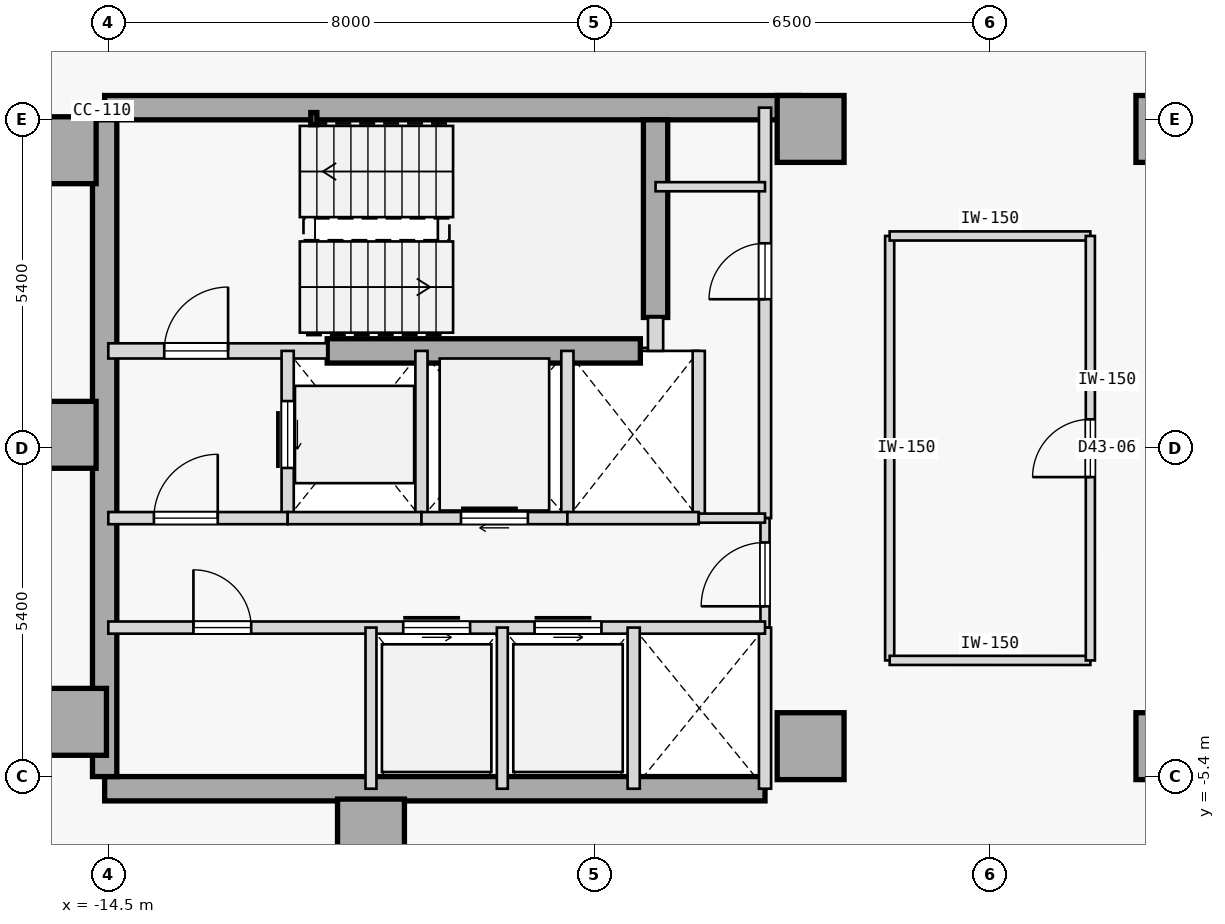
"""IFC4 building model, lengths in metres.
Left out: names, types, materials, properties, quantities, classifications, styles, units other than length and angle.
Written with IfcOpenShell. Run it as: python <this file> out.ifc"""

import sys

from ifc_helpers import new_model, si_unit, direction, frame, frame_2d, origin, origin_2d, place, context, subcontext, project, spatial, rectangle, hollow_rectangle, extrude, element, fill, save


model = new_model("IFC4")
c1 = context("Model", 3, precision=1e-05, world=origin(), true_north=direction((0.0, 1.0)))
c2 = subcontext(c1, "Body", "Model", "MODEL_VIEW")
j1 = project(units=[si_unit("LENGTHUNIT", "METRE"), si_unit("PLANEANGLEUNIT", "RADIAN")], contexts=[c1])
p1 = place(None, origin())
s1 = spatial("IfcSite", under=j1, at=p1, CompositionType="ELEMENT")
p2 = place(p1, origin())
s2 = spatial("IfcBuilding", under=s1, at=p2, CompositionType="ELEMENT")
p3 = place(p2, frame((0.0, 0.0, 168.4)))
s3 = spatial("IfcBuildingStorey", under=s2, at=p3, CompositionType="ELEMENT", Elevation=168.4)
for number, where, z_axis, x_axis in (
    (1, (-15.25, 4.9, 0.0), (0.0, 0.0, 1.0), (1.0, 0.0, 0.0)),
    (2, (-15.25, 0.22, 0.0), (0.0, 0.0, 1.0), (1.0, 0.0, 0.0)),
    (3, (-15.08, -4.5, 0.0), (0.0, 0.0, 1.0), (1.0, 0.0, 0.0)),
    (4, (-10.18, -6.32, 0.0), (0.0, 0.0, 1.0), (1.0, 0.0, 0.0)),
    (5, (-2.95, -4.9, 0.0), (0.0, 0.0, 1.0), (1.0, 0.0, 0.0)),
    (6, (-2.95, 5.25, 0.0), (0.0, 0.0, 1.0), (1.0, 0.0, 0.0)),
    (7, (2.95, -4.9, 0.0), (0.0, 0.0, 1.0), (1.0, 0.0, 0.0)),
    (8, (2.95, 5.25, 0.0), (0.0, 0.0, 1.0), (1.0, 0.0, 0.0)),
):
    element("IfcColumn", number, at=place(p3, frame(where, z_axis=z_axis, x_axis=x_axis)), inside=s3, PredefinedType="COLUMN", context=c2, shape_type="SweptSolid", body=[
        extrude(rectangle(XDim=1.1, YDim=1.1, at=origin_2d()), origin(), (0.0, 0.0, 1.0), 3.4),
    ])
p4 = place(p3, frame((-14.56, 5.6, 0.0), z_axis=(0.0, 0.0, 1.0), x_axis=(1.0, 0.0, 0.0)))
e9 = element("IfcWall", 9, at=p4, inside=s3, PredefinedType="SHEAR", context=c2, shape_type="SweptSolid", body=[
    extrude(rectangle(XDim=11.41, YDim=0.4, at=frame_2d((5.705, 0.0))), origin(), (0.0, 0.0, 1.0), 3.175),
])
p5 = place(p3, frame((-14.56, -5.6, 0.0), z_axis=(0.0, 0.0, 1.0), x_axis=(1.0, 0.0, 0.0)))
e10 = element("IfcWall", 10, at=p5, inside=s3, PredefinedType="SHEAR", context=c2, shape_type="SweptSolid", body=[
    extrude(rectangle(XDim=10.86, YDim=0.4, at=frame_2d((5.43, 0.0))), origin(), (0.0, 0.0, 1.0), 3.175),
])
p6 = place(p3, frame((-14.56, -5.4, 0.0), z_axis=(0.0, 0.0, 1.0), x_axis=(0.0, 1.0, 0.0)))
e11 = element("IfcWall", 11, at=p6, inside=s3, PredefinedType="SHEAR", context=c2, shape_type="SweptSolid", body=[
    extrude(rectangle(XDim=10.8, YDim=0.4, at=frame_2d((5.4, 0.0))), origin(), (0.0, 0.0, 1.0), 3.175),
])
p7 = place(p3, frame((-5.5, 2.15, 0.0), z_axis=(0.0, 0.0, 1.0), x_axis=(0.0, 1.0, 0.0)))
e12 = element("IfcWall", 12, at=p7, inside=s3, PredefinedType="SHEAR", context=c2, shape_type="SweptSolid", body=[
    extrude(rectangle(XDim=3.25, YDim=0.4, at=frame_2d((1.625, 0.0))), origin(), (0.0, 0.0, 1.0), 3.175),
])
p8 = place(p3, frame((-10.9, 1.6, 0.0), z_axis=(0.0, 0.0, 1.0), x_axis=(1.0, 0.0, 0.0)))
e13 = element("IfcWall", 13, at=p8, inside=s3, PredefinedType="SHEAR", context=c2, shape_type="SweptSolid", body=[
    extrude(rectangle(XDim=5.15, YDim=0.4, at=frame_2d((2.575, 0.0))), origin(), (0.0, 0.0, 1.0), 3.175),
])
p9 = place(p3, frame((-11.12, 5.42, 0.0), z_axis=(0.0, 0.0, 1.0), x_axis=(1.0, 0.0, 0.0)))
e14 = element("IfcColumn", 14, at=p9, inside=s3, PredefinedType="COLUMN", context=c2, shape_type="SweptSolid", body=[
    extrude(hollow_rectangle(XDim=0.1, YDim=0.2, WallThickness=0.008, at=origin_2d()), origin(), (0.0, 0.0, 1.0), 3.4),
])
p10 = place(p3, frame((-14.5, 1.6, 0.0), z_axis=(0.0, 0.0, 1.0), x_axis=(1.0, 0.0, 0.0)))
e15 = element("IfcWall", 15, at=p10, inside=s3, PredefinedType="STANDARD", context=c2, shape_type="SweptSolid", body=[
    extrude(rectangle(XDim=3.6, YDim=0.25, at=frame_2d((1.8, 0.0))), origin(), (0.0, 0.0, 1.0), 3.175),
])
p11 = place(p10, frame((0.92, 0.0, 0.0)))
e16 = element("IfcOpeningElement", 16, at=p11, cuts=e15, PredefinedType="OPENING", context=c2, shape_type="SweptSolid", body=[
    extrude(rectangle(XDim=1.05, YDim=2.15, at=frame_2d((0.525, 1.075))), frame((0.0, 0.135, 0.0), z_axis=(0.0, -1.0, 0.0), x_axis=(1.0, 0.0, 0.0)), (0.0, 0.0, 1.0), 0.27),
])
p12 = place(p3, frame((-5.5, 1.6, 0.0), z_axis=(0.0, 0.0, 1.0), x_axis=(0.0, 1.0, 0.0)))
e17 = element("IfcWall", 17, at=p12, inside=s3, PredefinedType="STANDARD", context=c2, shape_type="SweptSolid", body=[
    extrude(rectangle(XDim=0.55, YDim=0.25, at=frame_2d((0.275, 0.0))), origin(), (0.0, 0.0, 1.0), 3.175),
])
p13 = place(p3, frame((-3.7, -1.15, 0.0), z_axis=(0.0, 0.0, 1.0), x_axis=(0.0, 1.0, 0.0)))
e18 = element("IfcWall", 18, at=p13, inside=s3, PredefinedType="STANDARD", context=c2, shape_type="SweptSolid", body=[
    extrude(rectangle(XDim=6.75, YDim=0.2, at=frame_2d((3.375, 0.0))), origin(), (0.0, 0.0, 1.0), 3.175),
])
p14 = place(p13, frame((3.6, 0.0, 0.0)))
e19 = element("IfcOpeningElement", 19, at=p14, cuts=e18, PredefinedType="OPENING", context=c2, shape_type="SweptSolid", body=[
    extrude(rectangle(XDim=0.92, YDim=2.15, at=frame_2d((0.46, 1.075))), frame((0.0, 0.11, 0.0), z_axis=(0.0, -1.0, 0.0), x_axis=(1.0, 0.0, 0.0)), (0.0, 0.0, 1.0), 0.22),
])
p15 = place(p3, frame((-3.7, -2.95, 0.0), z_axis=(0.0, 0.0, 1.0), x_axis=(0.0, 1.0, 0.0)))
e20 = element("IfcWall", 20, at=p15, inside=s3, PredefinedType="PARTITIONING", context=c2, shape_type="SweptSolid", body=[
    extrude(rectangle(XDim=1.8, YDim=0.15, at=frame_2d((0.9, 0.0))), origin(), (0.0, 0.0, 1.0), 3.175),
])
p16 = place(p15, frame((0.35, 0.0, 0.0)))
e21 = element("IfcOpeningElement", 21, at=p16, cuts=e20, PredefinedType="OPENING", context=c2, shape_type="SweptSolid", body=[
    extrude(rectangle(XDim=1.05, YDim=2.18, at=frame_2d((0.525, 1.09))), frame((0.0, 0.085, 0.0), z_axis=(0.0, -1.0, 0.0), x_axis=(1.0, 0.0, 0.0)), (0.0, 0.0, 1.0), 0.17),
])
p17 = place(p3, frame((-3.7, -5.6, 0.0), z_axis=(0.0, 0.0, 1.0), x_axis=(0.0, 1.0, 0.0)))
e22 = element("IfcWall", 22, at=p17, inside=s3, PredefinedType="STANDARD", context=c2, shape_type="SweptSolid", body=[
    extrude(rectangle(XDim=2.65, YDim=0.2, at=frame_2d((1.325, 0.0))), origin(), (0.0, 0.0, 1.0), 3.175),
])
p18 = place(p3, frame((-11.55, -1.15, 0.0), z_axis=(0.0, 0.0, 1.0), x_axis=(0.0, 1.0, 0.0)))
e23 = element("IfcWall", 23, at=p18, inside=s3, PredefinedType="STANDARD", context=c2, shape_type="SweptSolid", body=[
    extrude(rectangle(XDim=2.75, YDim=0.2, at=frame_2d((1.375, 0.0))), origin(), (0.0, 0.0, 1.0), 3.175),
])
p19 = place(p18, frame((0.825, 0.0, 0.0)))
e24 = element("IfcOpeningElement", 24, at=p19, cuts=e23, PredefinedType="OPENING", context=c2, shape_type="SweptSolid", body=[
    extrude(rectangle(XDim=1.1, YDim=2.15, at=frame_2d((0.55, 1.075))), frame((0.0, 0.11, 0.0), z_axis=(0.0, -1.0, 0.0), x_axis=(1.0, 0.0, 0.0)), (0.0, 0.0, 1.0), 0.22),
])
p20 = place(p3, frame((-9.35, -1.15, 0.0), z_axis=(0.0, 0.0, 1.0), x_axis=(0.0, 1.0, 0.0)))
e25 = element("IfcWall", 25, at=p20, inside=s3, PredefinedType="STANDARD", context=c2, shape_type="SweptSolid", body=[
    extrude(rectangle(XDim=2.75, YDim=0.2, at=frame_2d((1.375, 0.0))), origin(), (0.0, 0.0, 1.0), 3.175),
])
p21 = place(p3, frame((-14.5, -1.15, 0.0), z_axis=(0.0, 0.0, 1.0), x_axis=(1.0, 0.0, 0.0)))
e26 = element("IfcWall", 26, at=p21, inside=s3, PredefinedType="STANDARD", context=c2, shape_type="SweptSolid", body=[
    extrude(rectangle(XDim=2.95, YDim=0.2, at=frame_2d((1.475, 0.0))), origin(), (0.0, 0.0, 1.0), 3.175),
])
p22 = place(p21, frame((0.75, 0.0, 0.0)))
e27 = element("IfcOpeningElement", 27, at=p22, cuts=e26, PredefinedType="OPENING", context=c2, shape_type="SweptSolid", body=[
    extrude(rectangle(XDim=1.05, YDim=2.18, at=frame_2d((0.525, 1.09))), frame((0.0, 0.11, 0.0), z_axis=(0.0, -1.0, 0.0), x_axis=(1.0, 0.0, 0.0)), (0.0, 0.0, 1.0), 0.22),
])
p23 = place(p3, frame((-11.55, -1.15, 0.0), z_axis=(0.0, 0.0, 1.0), x_axis=(1.0, 0.0, 0.0)))
e28 = element("IfcWall", 28, at=p23, inside=s3, PredefinedType="STANDARD", context=c2, shape_type="SweptSolid", body=[
    extrude(rectangle(XDim=2.2, YDim=0.2, at=frame_2d((1.1, 0.0))), origin(), (0.0, 0.0, 1.0), 3.175),
])
p24 = place(p3, frame((-6.95, -1.15, 0.0), z_axis=(0.0, 0.0, 1.0), x_axis=(0.0, 1.0, 0.0)))
e29 = element("IfcWall", 29, at=p24, inside=s3, PredefinedType="STANDARD", context=c2, shape_type="SweptSolid", body=[
    extrude(rectangle(XDim=2.75, YDim=0.2, at=frame_2d((1.375, 0.0))), origin(), (0.0, 0.0, 1.0), 3.175),
])
p25 = place(p3, frame((-9.35, -1.15, 0.0), z_axis=(0.0, 0.0, 1.0), x_axis=(1.0, 0.0, 0.0)))
e30 = element("IfcWall", 30, at=p25, inside=s3, PredefinedType="STANDARD", context=c2, shape_type="SweptSolid", body=[
    extrude(rectangle(XDim=2.4, YDim=0.2, at=frame_2d((1.2, 0.0))), origin(), (0.0, 0.0, 1.0), 3.175),
])
p26 = place(p25, frame((0.65, 0.0, 0.0)))
e31 = element("IfcOpeningElement", 31, at=p26, cuts=e30, PredefinedType="OPENING", context=c2, shape_type="SweptSolid", body=[
    extrude(rectangle(XDim=1.1, YDim=2.15, at=frame_2d((0.55, 1.075))), frame((0.0, 0.11, 0.0), z_axis=(0.0, -1.0, 0.0), x_axis=(1.0, 0.0, 0.0)), (0.0, 0.0, 1.0), 0.22),
])
p27 = place(p3, frame((-4.79, -1.15, 0.0), z_axis=(0.0, 0.0, 1.0), x_axis=(0.0, 1.0, 0.0)))
e32 = element("IfcWall", 32, at=p27, inside=s3, PredefinedType="STANDARD", context=c2, shape_type="SweptSolid", body=[
    extrude(rectangle(XDim=2.75, YDim=0.2, at=frame_2d((1.375, 0.0))), origin(), (0.0, 0.0, 1.0), 3.175),
])
p28 = place(p3, frame((-6.95, -1.15, 0.0), z_axis=(0.0, 0.0, 1.0), x_axis=(1.0, 0.0, 0.0)))
e33 = element("IfcWall", 33, at=p28, inside=s3, PredefinedType="STANDARD", context=c2, shape_type="SweptSolid", body=[
    extrude(rectangle(XDim=2.16, YDim=0.2, at=frame_2d((1.08, 0.0))), origin(), (0.0, 0.0, 1.0), 3.175),
])
p29 = place(p3, frame((-4.79, -1.15, 0.0), z_axis=(0.0, 0.0, 1.0), x_axis=(1.0, 0.0, 0.0)))
e34 = element("IfcWall", 34, at=p29, inside=s3, PredefinedType="PARTITIONING", context=c2, shape_type="SweptSolid", body=[
    extrude(rectangle(XDim=1.09, YDim=0.15, at=frame_2d((0.545, 0.0))), origin(), (0.0, 0.0, 1.0), 3.175),
])
p30 = place(p3, frame((-14.5, -2.95, 0.0), z_axis=(0.0, 0.0, 1.0), x_axis=(1.0, 0.0, 0.0)))
e35 = element("IfcWall", 35, at=p30, inside=s3, PredefinedType="STANDARD", context=c2, shape_type="SweptSolid", body=[
    extrude(rectangle(XDim=10.8, YDim=0.2, at=frame_2d((5.4, 0.0))), origin(), (0.0, 0.0, 1.0), 3.175),
])
p31 = place(p30, frame((4.85, 0.0, 0.0)))
e36 = element("IfcOpeningElement", 36, at=p31, cuts=e35, PredefinedType="OPENING", context=c2, shape_type="SweptSolid", body=[
    extrude(rectangle(XDim=1.1, YDim=2.15, at=frame_2d((0.55, 1.075))), frame((0.0, 0.11, 0.0), z_axis=(0.0, -1.0, 0.0), x_axis=(1.0, 0.0, 0.0)), (0.0, 0.0, 1.0), 0.22),
])
p32 = place(p30, frame((7.01, 0.0, 0.0)))
e37 = element("IfcOpeningElement", 37, at=p32, cuts=e35, PredefinedType="OPENING", context=c2, shape_type="SweptSolid", body=[
    extrude(rectangle(XDim=1.1, YDim=2.15, at=frame_2d((0.55, 1.075))), frame((0.0, 0.11, 0.0), z_axis=(0.0, -1.0, 0.0), x_axis=(1.0, 0.0, 0.0)), (0.0, 0.0, 1.0), 0.22),
])
p33 = place(p30, frame((1.4, 0.0, 0.0)))
e38 = element("IfcOpeningElement", 38, at=p33, cuts=e35, PredefinedType="OPENING", context=c2, shape_type="SweptSolid", body=[
    extrude(rectangle(XDim=0.95, YDim=2.15, at=frame_2d((0.475, 1.075))), frame((0.0, 0.11, 0.0), z_axis=(0.0, -1.0, 0.0), x_axis=(1.0, 0.0, 0.0)), (0.0, 0.0, 1.0), 0.22),
])
p34 = place(p3, frame((-5.86, -5.6, 0.0), z_axis=(0.0, 0.0, 1.0), x_axis=(0.0, 1.0, 0.0)))
e39 = element("IfcWall", 39, at=p34, inside=s3, PredefinedType="STANDARD", context=c2, shape_type="SweptSolid", body=[
    extrude(rectangle(XDim=2.65, YDim=0.2, at=frame_2d((1.325, 0.0))), origin(), (0.0, 0.0, 1.0), 3.175),
])
for number, where, z_axis, x_axis in (
    (40, (-10.18, -5.6, 0.0), (0.0, 0.0, 1.0), (0.0, 1.0, 0.0)),
    (41, (-8.02, -5.6, 0.0), (0.0, 0.0, 1.0), (0.0, 1.0, 0.0)),
):
    element("IfcWall", number, at=place(p3, frame(where, z_axis=z_axis, x_axis=x_axis)), inside=s3, PredefinedType="STANDARD", context=c2, shape_type="SweptSolid", body=[
        extrude(rectangle(XDim=2.65, YDim=0.18, at=frame_2d((1.325, 0.0))), origin(), (0.0, 0.0, 1.0), 3.175),
    ])
p35 = place(p3, frame((-5.5, 4.3, 0.0), z_axis=(0.0, 0.0, 1.0), x_axis=(1.0, 0.0, 0.0)))
e42 = element("IfcWall", 42, at=p35, inside=s3, PredefinedType="PARTITIONING", context=c2, shape_type="SweptSolid", body=[
    extrude(rectangle(XDim=1.8, YDim=0.15, at=frame_2d((0.9, 0.0))), origin(), (0.0, 0.0, 1.0), 3.175),
])
p36 = place(p3, frame((-1.65, -3.49, 0.0), z_axis=(0.0, 0.0, 1.0), x_axis=(-3.4979712e-05, 0.999999999388, 0.0)))
e43 = element("IfcWall", 43, at=p36, inside=s3, PredefinedType="PARTITIONING", context=c2, shape_type="SweptSolid", body=[
    extrude(rectangle(XDim=6.979, YDim=0.15, at=frame_2d((3.49, 0.0))), origin(), (0.0, 0.0, 1.0), 3.175),
])
p37 = place(p3, frame((-1.65, -3.49, 0.0), z_axis=(0.0, 0.0, 1.0), x_axis=(0.999999975374, -0.000221926315, 0.0)))
e44 = element("IfcWall", 44, at=p37, inside=s3, PredefinedType="PARTITIONING", context=c2, shape_type="SweptSolid", body=[
    extrude(rectangle(XDim=3.3, YDim=0.15, at=frame_2d((1.65, 0.0))), origin(), (0.0, 0.0, 1.0), 3.175),
])
p38 = place(p3, frame((-1.65, 3.49, 0.0), z_axis=(0.0, 0.0, 1.0), x_axis=(1.0, 0.0, 0.0)))
e45 = element("IfcWall", 45, at=p38, inside=s3, PredefinedType="PARTITIONING", context=c2, shape_type="SweptSolid", body=[
    extrude(rectangle(XDim=3.3, YDim=0.15, at=frame_2d((1.65, 0.0))), origin(), (0.0, 0.0, 1.0), 3.175),
])
p39 = place(p3, frame((1.65, -3.49, 0.0), z_axis=(0.0, 0.0, 1.0), x_axis=(-6.9952083e-05, 0.999999997553, 0.0)))
e46 = element("IfcWall", 46, at=p39, inside=s3, PredefinedType="PARTITIONING", context=c2, shape_type="SweptSolid", body=[
    extrude(rectangle(XDim=6.98, YDim=0.15, at=frame_2d((3.49, 0.0))), origin(), (0.0, 0.0, 1.0), 3.175),
])
p40 = place(p39, frame((3.015, 0.0, 0.0)))
e47 = element("IfcOpeningElement", 47, at=p40, cuts=e46, PredefinedType="OPENING", context=c2, shape_type="SweptSolid", body=[
    extrude(rectangle(XDim=0.95, YDim=2.15, at=frame_2d((0.475, 1.075))), frame((0.0, 0.085, 0.0), z_axis=(0.0, -1.0, 0.0), x_axis=(1.0, 0.0, 0.0)), (0.0, 0.0, 1.0), 0.17),
])
p41 = place(p11, origin())
e48 = element("IfcDoor", 48, at=p41, inside=s3, OperationType="SINGLE_SWING_RIGHT", PredefinedType="DOOR", context=c2, shape_type="SweptSolid", body=[
    extrude(rectangle(XDim=1.05, YDim=2.15, at=frame_2d((0.525, 1.075))), frame((0.0, 0.025, 0.0), z_axis=(0.0, -1.0, 0.0), x_axis=(1.0, 0.0, 0.0)), (0.0, 0.0, 1.0), 0.05),
])
fill(e16, e48)
p42 = place(p22, origin())
e49 = element("IfcDoor", 49, at=p42, inside=s3, OperationType="SINGLE_SWING_RIGHT", PredefinedType="DOOR", context=c2, shape_type="SweptSolid", body=[
    extrude(rectangle(XDim=1.05, YDim=2.18, at=frame_2d((0.525, 1.09))), frame((0.0, 0.025, 0.0), z_axis=(0.0, -1.0, 0.0), x_axis=(1.0, 0.0, 0.0)), (0.0, 0.0, 1.0), 0.05),
])
fill(e27, e49)
p43 = place(p16, origin())
e50 = element("IfcDoor", 50, at=p43, inside=s3, OperationType="SINGLE_SWING_LEFT", PredefinedType="DOOR", context=c2, shape_type="SweptSolid", body=[
    extrude(rectangle(XDim=1.05, YDim=2.18, at=frame_2d((0.525, 1.09))), frame((0.0, 0.025, 0.0), z_axis=(0.0, -1.0, 0.0), x_axis=(1.0, 0.0, 0.0)), (0.0, 0.0, 1.0), 0.05),
])
fill(e21, e50)
p44 = place(p19, origin())
e51 = element("IfcDoor", 51, at=p44, inside=s3, OperationType="SLIDING_TO_RIGHT", PredefinedType="DOOR", context=c2, shape_type="SweptSolid", body=[
    extrude(rectangle(XDim=1.1, YDim=2.15, at=frame_2d((0.55, 1.075))), frame((0.0, 0.025, 0.0), z_axis=(0.0, -1.0, 0.0), x_axis=(1.0, 0.0, 0.0)), (0.0, 0.0, 1.0), 0.05),
])
fill(e24, e51)
p45 = place(p26, origin())
e52 = element("IfcDoor", 52, at=p45, inside=s3, OperationType="SLIDING_TO_RIGHT", PredefinedType="DOOR", context=c2, shape_type="SweptSolid", body=[
    extrude(rectangle(XDim=1.1, YDim=2.15, at=frame_2d((0.55, 1.075))), frame((0.0, 0.025, 0.0), z_axis=(0.0, -1.0, 0.0), x_axis=(1.0, 0.0, 0.0)), (0.0, 0.0, 1.0), 0.05),
])
fill(e31, e52)
p46 = place(p31, origin())
e53 = element("IfcDoor", 53, at=p46, inside=s3, OperationType="SLIDING_TO_LEFT", PredefinedType="DOOR", context=c2, shape_type="SweptSolid", body=[
    extrude(rectangle(XDim=1.1, YDim=2.15, at=frame_2d((0.55, 1.075))), frame((0.0, 0.025, 0.0), z_axis=(0.0, -1.0, 0.0), x_axis=(1.0, 0.0, 0.0)), (0.0, 0.0, 1.0), 0.05),
])
fill(e36, e53)
p47 = place(p32, origin())
e54 = element("IfcDoor", 54, at=p47, inside=s3, OperationType="SLIDING_TO_LEFT", PredefinedType="DOOR", context=c2, shape_type="SweptSolid", body=[
    extrude(rectangle(XDim=1.1, YDim=2.15, at=frame_2d((0.55, 1.075))), frame((0.0, 0.025, 0.0), z_axis=(0.0, -1.0, 0.0), x_axis=(1.0, 0.0, 0.0)), (0.0, 0.0, 1.0), 0.05),
])
fill(e37, e54)
p48 = place(p33, origin())
e55 = element("IfcDoor", 55, at=p48, inside=s3, OperationType="SINGLE_SWING_LEFT", PredefinedType="DOOR", context=c2, shape_type="SweptSolid", body=[
    extrude(rectangle(XDim=0.95, YDim=2.15, at=frame_2d((0.475, 1.075))), frame((0.0, 0.025, 0.0), z_axis=(0.0, -1.0, 0.0), x_axis=(1.0, 0.0, 0.0)), (0.0, 0.0, 1.0), 0.05),
])
fill(e38, e55)
p49 = place(p14, origin())
e56 = element("IfcDoor", 56, at=p49, inside=s3, OperationType="SINGLE_SWING_LEFT", PredefinedType="DOOR", context=c2, shape_type="SweptSolid", body=[
    extrude(rectangle(XDim=0.92, YDim=2.15, at=frame_2d((0.46, 1.075))), frame((0.0, 0.025, 0.0), z_axis=(0.0, -1.0, 0.0), x_axis=(1.0, 0.0, 0.0)), (0.0, 0.0, 1.0), 0.05),
])
fill(e19, e56)
p50 = place(p40, origin())
e57 = element("IfcDoor", 57, at=p50, inside=s3, OperationType="SINGLE_SWING_LEFT", PredefinedType="DOOR", context=c2, shape_type="SweptSolid", body=[
    extrude(rectangle(XDim=0.95, YDim=2.15, at=frame_2d((0.475, 1.075))), frame((0.0, 0.025, 0.0), z_axis=(0.0, -1.0, 0.0), x_axis=(1.0, 0.0, 0.0)), (0.0, 0.0, 1.0), 0.05),
])
fill(e47, e57)
save(model, sys.argv[1])
